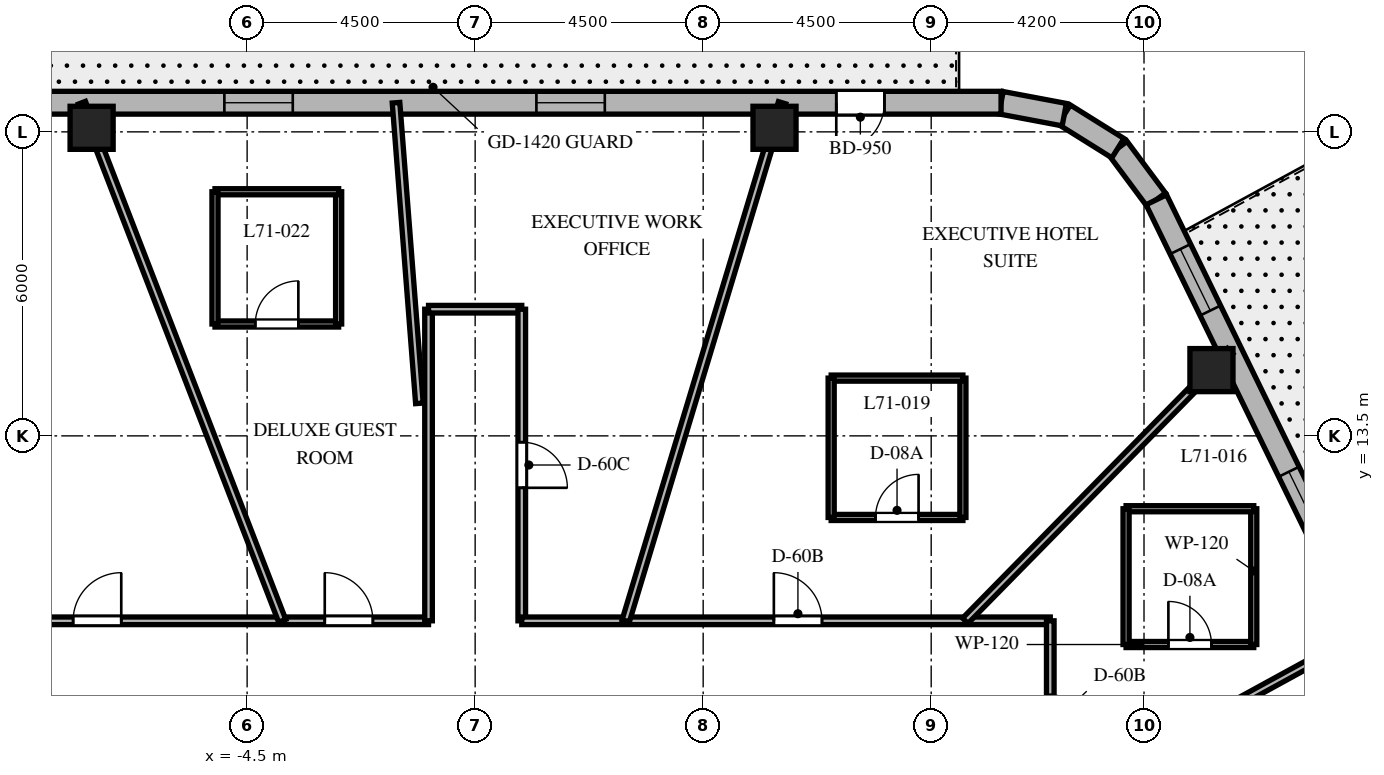
"""IFC4 building model, lengths in metres.
Left out: names, types, materials, properties, quantities, classifications, styles, units other than length and angle.
Written with IfcOpenShell. Run it as: python <this file> out.ifc"""

import sys

from ifc_helpers import new_model, si_unit, direction, frame, frame_2d, origin, origin_2d, place, context, subcontext, project, spatial, rectangle, extrude, element, fill, save


model = new_model("IFC4")
c1 = context("Model", 3, precision=1e-05, world=origin(), true_north=direction((0.0, 1.0)))
c2 = subcontext(c1, "Body", "Model", "MODEL_VIEW")
j1 = project(units=[si_unit("LENGTHUNIT", "METRE"), si_unit("PLANEANGLEUNIT", "RADIAN")], contexts=[c1])
p1 = place(None, origin())
s1 = spatial("IfcSite", under=j1, at=p1, CompositionType="ELEMENT")
p2 = place(p1, origin())
s2 = spatial("IfcBuilding", under=s1, at=p2, CompositionType="ELEMENT")
p3 = place(p2, frame((0.0, 0.0, 284.7)))
s3 = spatial("IfcBuildingStorey", under=s2, at=p3, CompositionType="ELEMENT", Elevation=284.7)
for number, where, z_axis, x_axis in (
    (1, (14.531, 14.798, 0.0), (0.0, 0.0, 1.0), (1.0, 0.0, 0.0)),
    (2, (5.908, 19.58, 0.0), (0.0, 0.0, 1.0), (1.0, 0.0, 0.0)),
    (3, (-7.569, 19.58, 0.0), (0.0, 0.0, 1.0), (1.0, 0.0, 0.0)),
):
    element("IfcColumn", number, at=place(p3, frame(where, z_axis=z_axis, x_axis=x_axis)), inside=s3, PredefinedType="COLUMN", context=c2, shape_type="SweptSolid", body=[
        extrude(rectangle(XDim=0.85, YDim=0.85, at=origin_2d()), origin(), (0.0, 0.0, 1.0), 3.9),
    ])
p4 = place(p3, frame((13.443, 18.16, 0.0), z_axis=(0.0, 0.0, 1.0), x_axis=(-0.597042425808, 0.802209661987, 0.0)))
e4 = element("IfcWall", 4, at=p4, inside=s3, PredefinedType="SOLIDWALL", context=c2, shape_type="SweptSolid", body=[
    extrude(rectangle(XDim=1.27, YDim=0.45, at=frame_2d((0.635, 0.0))), origin(), (0.0, 0.0, 1.0), 3.58),
])
p5 = place(p3, frame((12.685, 19.178, 0.0), z_axis=(0.0, 0.0, 1.0), x_axis=(-0.848031272749, 0.529946186362, 0.0)))
e5 = element("IfcWall", 5, at=p5, inside=s3, PredefinedType="SOLIDWALL", context=c2, shape_type="SweptSolid", body=[
    extrude(rectangle(XDim=1.248, YDim=0.45, at=frame_2d((0.624, 0.0))), origin(), (0.0, 0.0, 1.0), 3.58),
])
p6 = place(p3, frame((11.626, 19.84, 0.0), z_axis=(0.0, 0.0, 1.0), x_axis=(-0.982701956681, 0.185194126083, 0.0)))
e6 = element("IfcWall", 6, at=p6, inside=s3, PredefinedType="SOLIDWALL", context=c2, shape_type="SweptSolid", body=[
    extrude(rectangle(XDim=1.27, YDim=0.45, at=frame_2d((0.635, 0.0))), origin(), (0.0, 0.0, 1.0), 3.58),
])
p7 = place(p3, frame((21.138, 2.371, 0.0), z_axis=(0.0, 0.0, 1.0), x_axis=(-0.438128124058, 0.89891253574, 0.0)))
e7 = element("IfcWall", 7, at=p7, inside=s3, PredefinedType="SOLIDWALL", context=c2, shape_type="SweptSolid", body=[
    extrude(rectangle(XDim=17.565, YDim=0.45, at=frame_2d((8.782, 0.0))), origin(), (0.0, 0.0, 1.0), 3.58),
])
p8 = place(p7, frame((4.769, 0.0, 0.0)))
e8 = element("IfcOpeningElement", 8, at=p8, cuts=e7, PredefinedType="OPENING", context=c2, shape_type="SweptSolid", body=[
    extrude(rectangle(XDim=1.0, YDim=2.15, at=frame_2d((0.5, 1.075))), frame((0.0, 0.235, 0.0), z_axis=(0.0, -1.0, 0.0), x_axis=(1.0, 0.0, 0.0)), (0.0, 0.0, 1.0), 0.47),
])
p9 = place(p7, frame((10.243, 0.0, 0.8)))
e9 = element("IfcOpeningElement", 9, at=p9, cuts=e7, PredefinedType="OPENING", context=c2, shape_type="SweptSolid", body=[
    extrude(rectangle(XDim=1.35, YDim=1.75, at=frame_2d((0.675, 0.875))), frame((0.0, 0.235, 0.0), z_axis=(0.0, -1.0, 0.0), x_axis=(1.0, 0.0, 0.0)), (0.0, 0.0, 1.0), 0.47),
])
p10 = place(p7, frame((15.132, 0.0, 0.8)))
e10 = element("IfcOpeningElement", 10, at=p10, cuts=e7, PredefinedType="OPENING", context=c2, shape_type="SweptSolid", body=[
    extrude(rectangle(XDim=1.35, YDim=1.75, at=frame_2d((0.675, 0.875))), frame((0.0, 0.235, 0.0), z_axis=(0.0, -1.0, 0.0), x_axis=(1.0, 0.0, 0.0)), (0.0, 0.0, 1.0), 0.47),
])
p11 = place(p7, frame((1.133, 0.0, 0.8)))
e11 = element("IfcOpeningElement", 11, at=p11, cuts=e7, PredefinedType="OPENING", context=c2, shape_type="SweptSolid", body=[
    extrude(rectangle(XDim=1.35, YDim=1.75, at=frame_2d((0.675, 0.875))), frame((0.0, 0.235, 0.0), z_axis=(0.0, -1.0, 0.0), x_axis=(1.0, 0.0, 0.0)), (0.0, 0.0, 1.0), 0.47),
])
p12 = place(p3, frame((10.379, 20.075, 0.0), z_axis=(0.0, 0.0, 1.0), x_axis=(-1.0, 0.0, 0.0)))
e12 = element("IfcWall", 12, at=p12, inside=s3, PredefinedType="SOLIDWALL", context=c2, shape_type="SweptSolid", body=[
    extrude(rectangle(XDim=22.417, YDim=0.45, at=frame_2d((11.208, 0.0))), origin(), (0.0, 0.0, 1.0), 3.58),
])
p13 = place(p12, frame((2.302, 0.0, 0.0)))
e13 = element("IfcOpeningElement", 13, at=p13, cuts=e12, PredefinedType="OPENING", context=c2, shape_type="SweptSolid", body=[
    extrude(rectangle(XDim=0.95, YDim=2.15, at=frame_2d((0.475, 1.075))), frame((0.0, 0.235, 0.0), z_axis=(0.0, -1.0, 0.0), x_axis=(1.0, 0.0, 0.0)), (0.0, 0.0, 1.0), 0.47),
])
p14 = place(p12, frame((7.82, 0.0, 0.8)))
e14 = element("IfcOpeningElement", 14, at=p14, cuts=e12, PredefinedType="OPENING", context=c2, shape_type="SweptSolid", body=[
    extrude(rectangle(XDim=1.35, YDim=1.75, at=frame_2d((0.675, 0.875))), frame((0.0, 0.235, 0.0), z_axis=(0.0, -1.0, 0.0), x_axis=(1.0, 0.0, 0.0)), (0.0, 0.0, 1.0), 0.47),
])
p15 = place(p12, frame((13.978, 0.0, 0.8)))
e15 = element("IfcOpeningElement", 15, at=p15, cuts=e12, PredefinedType="OPENING", context=c2, shape_type="SweptSolid", body=[
    extrude(rectangle(XDim=1.35, YDim=1.75, at=frame_2d((0.675, 0.875))), frame((0.0, 0.235, 0.0), z_axis=(0.0, -1.0, 0.0), x_axis=(1.0, 0.0, 0.0)), (0.0, 0.0, 1.0), 0.47),
])
p16 = place(p12, frame((19.587, 0.0, 0.8)))
e16 = element("IfcOpeningElement", 16, at=p16, cuts=e12, PredefinedType="OPENING", context=c2, shape_type="SweptSolid", body=[
    extrude(rectangle(XDim=1.35, YDim=1.75, at=frame_2d((0.675, 0.875))), frame((0.0, 0.235, 0.0), z_axis=(0.0, -1.0, 0.0), x_axis=(1.0, 0.0, 0.0)), (0.0, 0.0, 1.0), 0.47),
])
p17 = place(p3, frame((-11.35, 9.85, 0.0), z_axis=(0.0, 0.0, 1.0), x_axis=(1.0, 0.0, 0.0)))
e17 = element("IfcWall", 17, at=p17, inside=s3, PredefinedType="PARTITIONING", context=c2, shape_type="SweptSolid", body=[
    extrude(rectangle(XDim=10.43, YDim=0.15, at=frame_2d((5.215, 0.0))), origin(), (0.0, 0.0, 1.0), 3.07),
])
p18 = place(p17, frame((8.382, 0.0, 0.0)))
e18 = element("IfcOpeningElement", 18, at=p18, cuts=e17, PredefinedType="OPENING", context=c2, shape_type="SweptSolid", body=[
    extrude(rectangle(XDim=0.95, YDim=2.03, at=frame_2d((0.475, 1.015))), frame((0.0, 0.085, 0.0), z_axis=(0.0, -1.0, 0.0), x_axis=(1.0, 0.0, 0.0)), (0.0, 0.0, 1.0), 0.17),
])
p19 = place(p17, frame((3.416, 0.0, 0.0)))
e19 = element("IfcOpeningElement", 19, at=p19, cuts=e17, PredefinedType="OPENING", context=c2, shape_type="SweptSolid", body=[
    extrude(rectangle(XDim=0.95, YDim=2.03, at=frame_2d((0.475, 1.015))), frame((0.0, 0.085, 0.0), z_axis=(0.0, -1.0, 0.0), x_axis=(1.0, 0.0, 0.0)), (0.0, 0.0, 1.0), 0.17),
])
p20 = place(p3, frame((-0.92, 9.85, 0.0), z_axis=(0.0, 0.0, 1.0), x_axis=(0.0, 1.0, 0.0)))
e20 = element("IfcWall", 20, at=p20, inside=s3, PredefinedType="PARTITIONING", context=c2, shape_type="SweptSolid", body=[
    extrude(rectangle(XDim=6.15, YDim=0.15, at=frame_2d((3.075, 0.0))), origin(), (0.0, 0.0, 1.0), 3.021),
])
p21 = place(p3, frame((-0.92, 16.0, 0.0), z_axis=(0.0, 0.0, 1.0), x_axis=(1.0, 0.0, 0.0)))
e21 = element("IfcWall", 21, at=p21, inside=s3, PredefinedType="PARTITIONING", context=c2, shape_type="SweptSolid", body=[
    extrude(rectangle(XDim=1.84, YDim=0.15, at=frame_2d((0.92, 0.0))), origin(), (0.0, 0.0, 1.0), 3.58),
])
p22 = place(p3, frame((0.92, 16.0, 0.0), z_axis=(0.0, 0.0, 1.0), x_axis=(0.0, -1.0, 0.0)))
e22 = element("IfcWall", 22, at=p22, inside=s3, PredefinedType="PARTITIONING", context=c2, shape_type="SweptSolid", body=[
    extrude(rectangle(XDim=6.15, YDim=0.15, at=frame_2d((3.075, 0.0))), origin(), (0.0, 0.0, 1.0), 3.021),
])
p23 = place(p22, frame((2.625, 0.0, 0.0)))
e23 = element("IfcOpeningElement", 23, at=p23, cuts=e22, PredefinedType="OPENING", context=c2, shape_type="SweptSolid", body=[
    extrude(rectangle(XDim=0.9, YDim=2.03, at=frame_2d((0.45, 1.015))), frame((0.0, 0.085, 0.0), z_axis=(0.0, -1.0, 0.0), x_axis=(1.0, 0.0, 0.0)), (0.0, 0.0, 1.0), 0.17),
])
p24 = place(p3, frame((0.92, 9.85, 0.0), z_axis=(0.0, 0.0, 1.0), x_axis=(1.0, 0.0, 0.0)))
e24 = element("IfcWall", 24, at=p24, inside=s3, PredefinedType="PARTITIONING", context=c2, shape_type="SweptSolid", body=[
    extrude(rectangle(XDim=10.43, YDim=0.15, at=frame_2d((5.215, 0.0))), origin(), (0.0, 0.0, 1.0), 3.07),
])
p25 = place(p24, frame((4.975, 0.0, 0.0)))
e25 = element("IfcOpeningElement", 25, at=p25, cuts=e24, PredefinedType="OPENING", context=c2, shape_type="SweptSolid", body=[
    extrude(rectangle(XDim=0.95, YDim=2.03, at=frame_2d((0.475, 1.015))), frame((0.0, 0.085, 0.0), z_axis=(0.0, -1.0, 0.0), x_axis=(1.0, 0.0, 0.0)), (0.0, 0.0, 1.0), 0.17),
])
p26 = place(p3, frame((11.35, 9.85, 0.0), z_axis=(0.0, 0.0, 1.0), x_axis=(0.0, -1.0, 0.0)))
e26 = element("IfcWall", 26, at=p26, inside=s3, PredefinedType="PARTITIONING", context=c2, shape_type="SweptSolid", body=[
    extrude(rectangle(XDim=12.4, YDim=0.15, at=frame_2d((6.2, 0.0))), origin(), (0.0, 0.0, 1.0), 3.07),
])
p27 = place(p26, frame((4.705, 0.0, 0.0)))
e27 = element("IfcOpeningElement", 27, at=p27, cuts=e26, PredefinedType="OPENING", context=c2, shape_type="SweptSolid", body=[
    extrude(rectangle(XDim=0.9, YDim=2.03, at=frame_2d((0.45, 1.015))), frame((0.0, 0.085, 0.0), z_axis=(0.0, -1.0, 0.0), x_axis=(1.0, 0.0, 0.0)), (0.0, 0.0, 1.0), 0.17),
])
p28 = place(p26, frame((1.463, 0.0, 0.0)))
e28 = element("IfcOpeningElement", 28, at=p28, cuts=e26, PredefinedType="OPENING", context=c2, shape_type="SweptSolid", body=[
    extrude(rectangle(XDim=0.95, YDim=2.03, at=frame_2d((0.475, 1.015))), frame((0.0, 0.085, 0.0), z_axis=(0.0, -1.0, 0.0), x_axis=(1.0, 0.0, 0.0)), (0.0, 0.0, 1.0), 0.17),
])
p29 = place(p26, frame((8.835, 0.0, 0.0)))
e29 = element("IfcOpeningElement", 29, at=p29, cuts=e26, PredefinedType="OPENING", context=c2, shape_type="SweptSolid", body=[
    extrude(rectangle(XDim=0.95, YDim=2.03, at=frame_2d((0.475, 1.015))), frame((0.0, 0.085, 0.0), z_axis=(0.0, -1.0, 0.0), x_axis=(1.0, 0.0, 0.0)), (0.0, 0.0, 1.0), 0.17),
])
p30 = place(p3, frame((11.35, 6.213, 0.0), z_axis=(0.0, 0.0, 1.0), x_axis=(0.877157109774, 0.480203503499, 0.0)))
e30 = element("IfcWall", 30, at=p30, inside=s3, PredefinedType="PARTITIONING", context=c2, shape_type="SweptSolid", body=[
    extrude(rectangle(XDim=7.123, YDim=0.15, at=frame_2d((3.562, 0.0))), origin(), (0.0, 0.0, 1.0), 2.92),
])
p31 = place(p3, frame((9.672, 9.85, 0.0), z_axis=(0.0, 0.0, 1.0), x_axis=(0.700629771301, 0.713524998558, 0.0)))
e31 = element("IfcWall", 31, at=p31, inside=s3, PredefinedType="PARTITIONING", context=c2, shape_type="SweptSolid", body=[
    extrude(rectangle(XDim=7.459, YDim=0.15, at=frame_2d((3.73, 0.0))), origin(), (0.0, 0.0, 1.0), 2.92),
])
p32 = place(p3, frame((2.972, 9.85, 0.0), z_axis=(0.0, 0.0, 1.0), x_axis=(0.288872169679, 0.957367677324, 0.0)))
e32 = element("IfcWall", 32, at=p32, inside=s3, PredefinedType="PARTITIONING", context=c2, shape_type="SweptSolid", body=[
    extrude(rectangle(XDim=10.68, YDim=0.15, at=frame_2d((5.34, 0.0))), origin(), (0.0, 0.0, 1.0), 2.92),
])
p33 = place(p3, frame((-1.1, 14.142, 0.0), z_axis=(0.0, 0.0, 1.0), x_axis=(-0.077534071454, 0.996989702938, 0.0)))
e33 = element("IfcWall", 33, at=p33, inside=s3, PredefinedType="PARTITIONING", context=c2, shape_type="SweptSolid", body=[
    extrude(rectangle(XDim=5.951, YDim=0.15, at=frame_2d((2.976, 0.0))), origin(), (0.0, 0.0, 1.0), 2.92),
])
p34 = place(p3, frame((-3.808, 9.85, 0.0), z_axis=(0.0, 0.0, 1.0), x_axis=(-0.360587327934, 0.932725457427, 0.0)))
e34 = element("IfcWall", 34, at=p34, inside=s3, PredefinedType="PARTITIONING", context=c2, shape_type="SweptSolid", body=[
    extrude(rectangle(XDim=10.962, YDim=0.15, at=frame_2d((5.481, 0.0))), origin(), (0.0, 0.0, 1.0), 2.92),
])
p35 = place(p3, frame((12.846, 9.382, 0.0), z_axis=(0.0, 0.0, 1.0), x_axis=(1.0, 0.0, 0.0)))
e35 = element("IfcWall", 35, at=p35, inside=s3, PredefinedType="PARTITIONING", context=c2, shape_type="SweptSolid", body=[
    extrude(rectangle(XDim=2.52, YDim=0.12, at=frame_2d((1.26, 0.0))), origin(), (0.0, 0.0, 1.0), 3.106),
])
p36 = place(p35, frame((0.835, 0.0, 0.0)))
e36 = element("IfcOpeningElement", 36, at=p36, cuts=e35, PredefinedType="OPENING", context=c2, shape_type="SweptSolid", body=[
    extrude(rectangle(XDim=0.85, YDim=2.03, at=frame_2d((0.425, 1.015))), frame((0.0, 0.07, 0.0), z_axis=(0.0, -1.0, 0.0), x_axis=(1.0, 0.0, 0.0)), (0.0, 0.0, 1.0), 0.14),
])
p37 = place(p3, frame((15.366, 9.382, 0.0), z_axis=(0.0, 0.0, 1.0), x_axis=(0.0, 1.0, 0.0)))
e37 = element("IfcWall", 37, at=p37, inside=s3, PredefinedType="PARTITIONING", context=c2, shape_type="SweptSolid", body=[
    extrude(rectangle(XDim=2.68, YDim=0.12, at=frame_2d((1.34, 0.0))), origin(), (0.0, 0.0, 1.0), 3.58),
])
p38 = place(p3, frame((15.366, 12.062, 0.0), z_axis=(0.0, 0.0, 1.0), x_axis=(-1.0, 0.0, 0.0)))
e38 = element("IfcWall", 38, at=p38, inside=s3, PredefinedType="PARTITIONING", context=c2, shape_type="SweptSolid", body=[
    extrude(rectangle(XDim=2.52, YDim=0.12, at=frame_2d((1.26, 0.0))), origin(), (0.0, 0.0, 1.0), 3.106),
])
p39 = place(p3, frame((12.846, 12.062, 0.0), z_axis=(0.0, 0.0, 1.0), x_axis=(0.0, -1.0, 0.0)))
e39 = element("IfcWall", 39, at=p39, inside=s3, PredefinedType="PARTITIONING", context=c2, shape_type="SweptSolid", body=[
    extrude(rectangle(XDim=2.68, YDim=0.12, at=frame_2d((1.34, 0.0))), origin(), (0.0, 0.0, 1.0), 3.106),
])
p40 = place(p3, frame((7.026, 11.89, 0.0), z_axis=(0.0, 0.0, 1.0), x_axis=(1.0, 0.0, 0.0)))
e40 = element("IfcWall", 40, at=p40, inside=s3, PredefinedType="PARTITIONING", context=c2, shape_type="SweptSolid", body=[
    extrude(rectangle(XDim=2.6, YDim=0.12, at=frame_2d((1.3, 0.0))), origin(), (0.0, 0.0, 1.0), 3.021),
])
p41 = place(p40, frame((0.875, 0.0, 0.0)))
e41 = element("IfcOpeningElement", 41, at=p41, cuts=e40, PredefinedType="OPENING", context=c2, shape_type="SweptSolid", body=[
    extrude(rectangle(XDim=0.85, YDim=2.03, at=frame_2d((0.425, 1.015))), frame((0.0, 0.07, 0.0), z_axis=(0.0, -1.0, 0.0), x_axis=(1.0, 0.0, 0.0)), (0.0, 0.0, 1.0), 0.14),
])
p42 = place(p3, frame((9.626, 11.89, 0.0), z_axis=(0.0, 0.0, 1.0), x_axis=(0.0, 1.0, 0.0)))
e42 = element("IfcWall", 42, at=p42, inside=s3, PredefinedType="PARTITIONING", context=c2, shape_type="SweptSolid", body=[
    extrude(rectangle(XDim=2.75, YDim=0.12, at=frame_2d((1.375, 0.0))), origin(), (0.0, 0.0, 1.0), 3.152),
])
p43 = place(p3, frame((9.626, 14.64, 0.0), z_axis=(0.0, 0.0, 1.0), x_axis=(-1.0, 0.0, 0.0)))
e43 = element("IfcWall", 43, at=p43, inside=s3, PredefinedType="PARTITIONING", context=c2, shape_type="SweptSolid", body=[
    extrude(rectangle(XDim=2.6, YDim=0.12, at=frame_2d((1.3, 0.0))), origin(), (0.0, 0.0, 1.0), 3.152),
])
p44 = place(p3, frame((7.026, 14.64, 0.0), z_axis=(0.0, 0.0, 1.0), x_axis=(0.0, -1.0, 0.0)))
e44 = element("IfcWall", 44, at=p44, inside=s3, PredefinedType="PARTITIONING", context=c2, shape_type="SweptSolid", body=[
    extrude(rectangle(XDim=2.75, YDim=0.12, at=frame_2d((1.375, 0.0))), origin(), (0.0, 0.0, 1.0), 3.021),
])
p45 = place(p3, frame((-5.134, 15.708, 0.0), z_axis=(0.0, 0.0, 1.0), x_axis=(1.0, 0.0, 0.0)))
e45 = element("IfcWall", 45, at=p45, inside=s3, PredefinedType="PARTITIONING", context=c2, shape_type="SweptSolid", body=[
    extrude(rectangle(XDim=2.44, YDim=0.12, at=frame_2d((1.22, 0.0))), origin(), (0.0, 0.0, 1.0), 3.021),
])
p46 = place(p45, frame((0.795, 0.0, 0.0)))
e46 = element("IfcOpeningElement", 46, at=p46, cuts=e45, PredefinedType="OPENING", context=c2, shape_type="SweptSolid", body=[
    extrude(rectangle(XDim=0.85, YDim=2.03, at=frame_2d((0.425, 1.015))), frame((0.0, 0.07, 0.0), z_axis=(0.0, -1.0, 0.0), x_axis=(1.0, 0.0, 0.0)), (0.0, 0.0, 1.0), 0.14),
])
p47 = place(p3, frame((-2.694, 15.708, 0.0), z_axis=(0.0, 0.0, 1.0), x_axis=(0.0, 1.0, 0.0)))
e47 = element("IfcWall", 47, at=p47, inside=s3, PredefinedType="PARTITIONING", context=c2, shape_type="SweptSolid", body=[
    extrude(rectangle(XDim=2.61, YDim=0.12, at=frame_2d((1.305, 0.0))), origin(), (0.0, 0.0, 1.0), 3.021),
])
p48 = place(p3, frame((-2.694, 18.318, 0.0), z_axis=(0.0, 0.0, 1.0), x_axis=(-1.0, 0.0, 0.0)))
e48 = element("IfcWall", 48, at=p48, inside=s3, PredefinedType="PARTITIONING", context=c2, shape_type="SweptSolid", body=[
    extrude(rectangle(XDim=2.44, YDim=0.12, at=frame_2d((1.22, 0.0))), origin(), (0.0, 0.0, 1.0), 3.58),
])
p49 = place(p3, frame((-5.134, 18.318, 0.0), z_axis=(0.0, 0.0, 1.0), x_axis=(0.0, -1.0, 0.0)))
e49 = element("IfcWall", 49, at=p49, inside=s3, PredefinedType="PARTITIONING", context=c2, shape_type="SweptSolid", body=[
    extrude(rectangle(XDim=2.61, YDim=0.12, at=frame_2d((1.305, 0.0))), origin(), (0.0, 0.0, 1.0), 3.021),
])
p50 = place(p9, origin())
e50 = element("IfcWindow", 50, at=p50, inside=s3, PartitioningType="SINGLE_PANEL", PredefinedType="WINDOW", context=c2, shape_type="SweptSolid", body=[
    extrude(rectangle(XDim=1.35, YDim=1.75, at=frame_2d((0.675, 0.875))), frame((0.0, 0.03, 0.0), z_axis=(0.0, -1.0, 0.0), x_axis=(1.0, 0.0, 0.0)), (0.0, 0.0, 1.0), 0.06),
])
fill(e9, e50)
p51 = place(p10, origin())
e51 = element("IfcWindow", 51, at=p51, inside=s3, PartitioningType="SINGLE_PANEL", PredefinedType="WINDOW", context=c2, shape_type="SweptSolid", body=[
    extrude(rectangle(XDim=1.35, YDim=1.75, at=frame_2d((0.675, 0.875))), frame((0.0, 0.03, 0.0), z_axis=(0.0, -1.0, 0.0), x_axis=(1.0, 0.0, 0.0)), (0.0, 0.0, 1.0), 0.06),
])
fill(e10, e51)
p52 = place(p13, origin())
e52 = element("IfcDoor", 52, at=p52, inside=s3, OperationType="SINGLE_SWING_RIGHT", PredefinedType="DOOR", context=c2, shape_type="SweptSolid", body=[
    extrude(rectangle(XDim=0.95, YDim=2.15, at=frame_2d((0.475, 1.075))), frame((0.0, 0.025, 0.0), z_axis=(0.0, -1.0, 0.0), x_axis=(1.0, 0.0, 0.0)), (0.0, 0.0, 1.0), 0.05),
])
fill(e13, e52)
p53 = place(p14, origin())
e53 = element("IfcWindow", 53, at=p53, inside=s3, PartitioningType="SINGLE_PANEL", PredefinedType="WINDOW", context=c2, shape_type="SweptSolid", body=[
    extrude(rectangle(XDim=1.35, YDim=1.75, at=frame_2d((0.675, 0.875))), frame((0.0, 0.03, 0.0), z_axis=(0.0, -1.0, 0.0), x_axis=(1.0, 0.0, 0.0)), (0.0, 0.0, 1.0), 0.06),
])
fill(e14, e53)
p54 = place(p15, origin())
e54 = element("IfcWindow", 54, at=p54, inside=s3, PartitioningType="SINGLE_PANEL", PredefinedType="WINDOW", context=c2, shape_type="SweptSolid", body=[
    extrude(rectangle(XDim=1.35, YDim=1.75, at=frame_2d((0.675, 0.875))), frame((0.0, 0.03, 0.0), z_axis=(0.0, -1.0, 0.0), x_axis=(1.0, 0.0, 0.0)), (0.0, 0.0, 1.0), 0.06),
])
fill(e15, e54)
p55 = place(p28, origin())
e55 = element("IfcDoor", 55, at=p55, inside=s3, OperationType="SINGLE_SWING_RIGHT", PredefinedType="DOOR", context=c2, shape_type="SweptSolid", body=[
    extrude(rectangle(XDim=0.95, YDim=2.03, at=frame_2d((0.475, 1.015))), frame((0.0, 0.025, 0.0), z_axis=(0.0, -1.0, 0.0), x_axis=(1.0, 0.0, 0.0)), (0.0, 0.0, 1.0), 0.05),
])
fill(e28, e55)
p56 = place(p36, origin())
e56 = element("IfcDoor", 56, at=p56, inside=s3, OperationType="SINGLE_SWING_LEFT", PredefinedType="DOOR", context=c2, shape_type="SweptSolid", body=[
    extrude(rectangle(XDim=0.85, YDim=2.03, at=frame_2d((0.425, 1.015))), frame((0.0, 0.025, 0.0), z_axis=(0.0, -1.0, 0.0), x_axis=(1.0, 0.0, 0.0)), (0.0, 0.0, 1.0), 0.05),
])
fill(e36, e56)
p57 = place(p25, origin())
e57 = element("IfcDoor", 57, at=p57, inside=s3, OperationType="SINGLE_SWING_LEFT", PredefinedType="DOOR", context=c2, shape_type="SweptSolid", body=[
    extrude(rectangle(XDim=0.95, YDim=2.03, at=frame_2d((0.475, 1.015))), frame((0.0, 0.025, 0.0), z_axis=(0.0, -1.0, 0.0), x_axis=(1.0, 0.0, 0.0)), (0.0, 0.0, 1.0), 0.05),
])
fill(e25, e57)
p58 = place(p41, origin())
e58 = element("IfcDoor", 58, at=p58, inside=s3, OperationType="SINGLE_SWING_RIGHT", PredefinedType="DOOR", context=c2, shape_type="SweptSolid", body=[
    extrude(rectangle(XDim=0.85, YDim=2.03, at=frame_2d((0.425, 1.015))), frame((0.0, 0.025, 0.0), z_axis=(0.0, -1.0, 0.0), x_axis=(1.0, 0.0, 0.0)), (0.0, 0.0, 1.0), 0.05),
])
fill(e41, e58)
p59 = place(p23, origin())
e59 = element("IfcDoor", 59, at=p59, inside=s3, OperationType="SINGLE_SWING_RIGHT", PredefinedType="DOOR", context=c2, shape_type="SweptSolid", body=[
    extrude(rectangle(XDim=0.9, YDim=2.03, at=frame_2d((0.45, 1.015))), frame((0.0, 0.025, 0.0), z_axis=(0.0, -1.0, 0.0), x_axis=(1.0, 0.0, 0.0)), (0.0, 0.0, 1.0), 0.05),
])
fill(e23, e59)
p60 = place(p18, origin())
e60 = element("IfcDoor", 60, at=p60, inside=s3, OperationType="SINGLE_SWING_LEFT", PredefinedType="DOOR", context=c2, shape_type="SweptSolid", body=[
    extrude(rectangle(XDim=0.95, YDim=2.03, at=frame_2d((0.475, 1.015))), frame((0.0, 0.025, 0.0), z_axis=(0.0, -1.0, 0.0), x_axis=(1.0, 0.0, 0.0)), (0.0, 0.0, 1.0), 0.05),
])
fill(e18, e60)
p61 = place(p46, origin())
e61 = element("IfcDoor", 61, at=p61, inside=s3, OperationType="SINGLE_SWING_RIGHT", PredefinedType="DOOR", context=c2, shape_type="SweptSolid", body=[
    extrude(rectangle(XDim=0.85, YDim=2.03, at=frame_2d((0.425, 1.015))), frame((0.0, 0.025, 0.0), z_axis=(0.0, -1.0, 0.0), x_axis=(1.0, 0.0, 0.0)), (0.0, 0.0, 1.0), 0.05),
])
fill(e46, e61)
p62 = place(p19, origin())
e62 = element("IfcDoor", 62, at=p62, inside=s3, OperationType="SINGLE_SWING_RIGHT", PredefinedType="DOOR", context=c2, shape_type="SweptSolid", body=[
    extrude(rectangle(XDim=0.95, YDim=2.03, at=frame_2d((0.475, 1.015))), frame((0.0, 0.025, 0.0), z_axis=(0.0, -1.0, 0.0), x_axis=(1.0, 0.0, 0.0)), (0.0, 0.0, 1.0), 0.05),
])
fill(e19, e62)
save(model, sys.argv[1])
